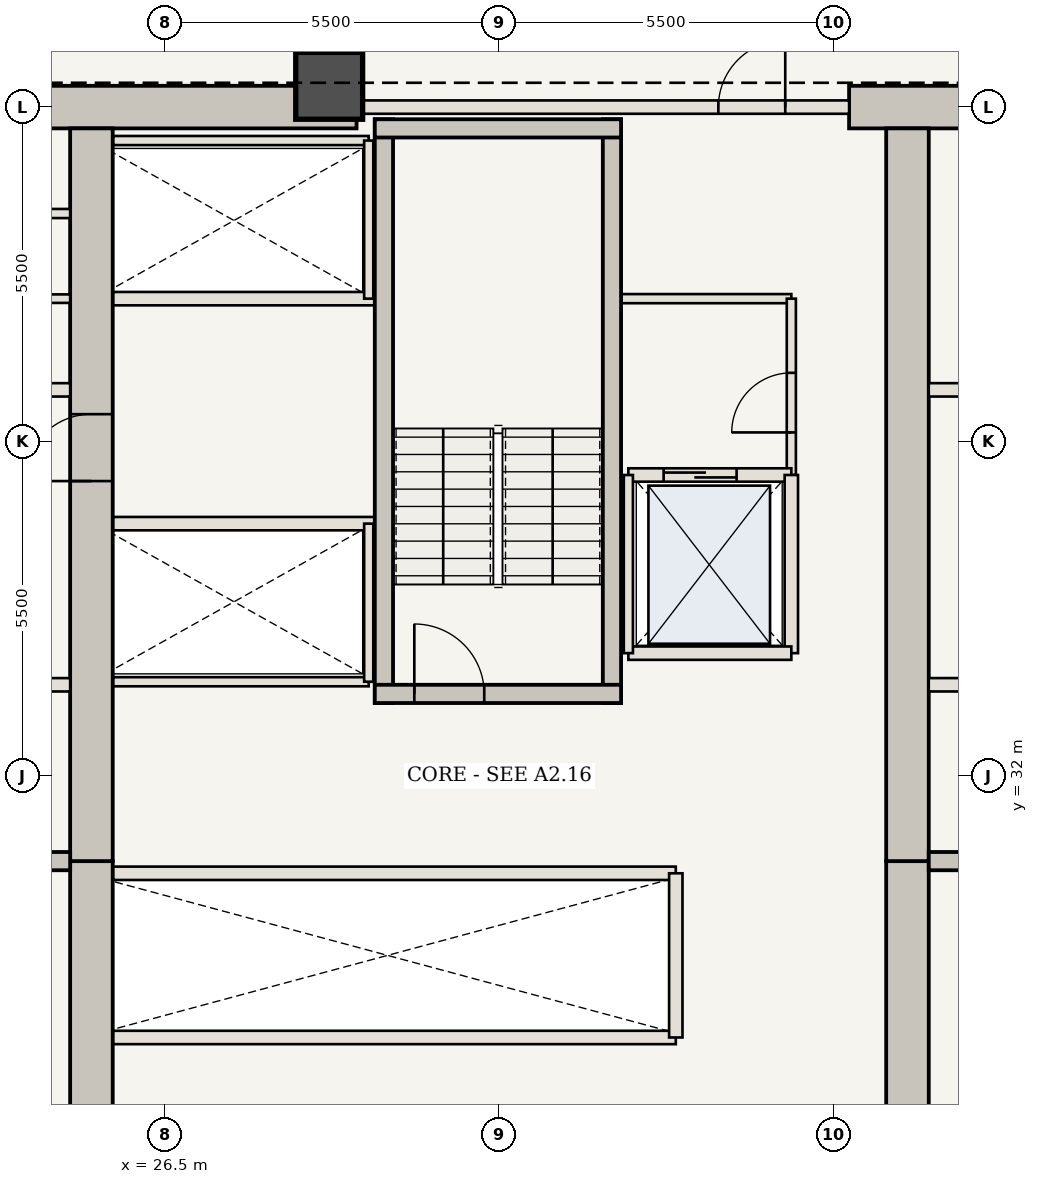
"""IFC4 building model, lengths in metres.
Left out: names, types, materials, properties, quantities, classifications, styles, units other than length and angle.
Written with IfcOpenShell. Run it as: python <this file> out.ifc"""

import sys

from ifc_helpers import new_model, si_unit, direction, frame, frame_2d, origin, origin_2d, place, context, subcontext, project, spatial, rectangle, extrude, element, fill, save


model = new_model("IFC4")
c1 = context("Model", 3, precision=1e-05, world=origin(), true_north=direction((0.0, 1.0)))
c2 = subcontext(c1, "Body", "Model", "MODEL_VIEW")
j1 = project(units=[si_unit("LENGTHUNIT", "METRE"), si_unit("PLANEANGLEUNIT", "RADIAN")], contexts=[c1])
p1 = place(None, origin())
s1 = spatial("IfcSite", under=j1, at=p1, CompositionType="ELEMENT")
p2 = place(p1, origin())
s2 = spatial("IfcBuilding", under=s1, at=p2, CompositionType="ELEMENT")
p3 = place(p2, frame((0.0, 0.0, 63.35)))
s3 = spatial("IfcBuildingStorey", under=s2, at=p3, CompositionType="ELEMENT", Elevation=63.35)
p4 = place(p3, frame((21.41, 43.0, 0.0), z_axis=(0.0, 0.0, 1.0), x_axis=(1.0, 0.0, 0.0)))
e1 = element("IfcWall", 1, at=p4, inside=s3, PredefinedType="SHEAR", context=c2, shape_type="SweptSolid", body=[
    extrude(rectangle(XDim=8.24, YDim=0.7, at=frame_2d((4.12, 0.0))), origin(), (0.0, 0.0, 1.0), 3.5),
])
p5 = place(p3, frame((37.75, 43.0, 0.0), z_axis=(0.0, 0.0, 1.0), x_axis=(1.0, 0.0, 0.0)))
e2 = element("IfcWall", 2, at=p5, inside=s3, PredefinedType="SHEAR", context=c2, shape_type="SweptSolid", body=[
    extrude(rectangle(XDim=4.84, YDim=0.7, at=frame_2d((2.42, 0.0))), origin(), (0.0, 0.0, 1.0), 3.5),
])
p6 = place(p3, frame((25.29, 21.3, 0.0), z_axis=(0.0, 0.0, 1.0), x_axis=(0.0, 1.0, 0.0)))
e3 = element("IfcWall", 3, at=p6, inside=s3, PredefinedType="SHEAR", context=c2, shape_type="SweptSolid", body=[
    extrude(rectangle(XDim=9.3, YDim=0.7, at=frame_2d((4.65, 0.0))), origin(), (0.0, 0.0, 1.0), 3.5),
])
p7 = place(p3, frame((25.29, 30.6, 0.0), z_axis=(0.0, 0.0, 1.0), x_axis=(0.0, 1.0, 0.0)))
e4 = element("IfcWall", 4, at=p7, inside=s3, PredefinedType="SHEAR", context=c2, shape_type="SweptSolid", body=[
    extrude(rectangle(XDim=12.05, YDim=0.7, at=frame_2d((6.025, 0.0))), origin(), (0.0, 0.0, 1.0), 3.5),
])
p8 = place(p7, frame((6.25, 0.0, 0.0)))
e5 = element("IfcOpeningElement", 5, at=p8, cuts=e4, PredefinedType="OPENING", context=c2, shape_type="SweptSolid", body=[
    extrude(rectangle(XDim=1.1, YDim=2.15, at=frame_2d((0.55, 1.075))), frame((0.0, 0.36, 0.0), z_axis=(0.0, -1.0, 0.0), x_axis=(1.0, 0.0, 0.0)), (0.0, 0.0, 1.0), 0.72),
])
p9 = place(p3, frame((38.71, 21.3, 0.0), z_axis=(0.0, 0.0, 1.0), x_axis=(0.0, 1.0, 0.0)))
e6 = element("IfcWall", 6, at=p9, inside=s3, PredefinedType="SHEAR", context=c2, shape_type="SweptSolid", body=[
    extrude(rectangle(XDim=9.3, YDim=0.7, at=frame_2d((4.65, 0.0))), origin(), (0.0, 0.0, 1.0), 3.5),
])
p10 = place(p3, frame((38.71, 30.6, 0.0), z_axis=(0.0, 0.0, 1.0), x_axis=(0.0, 1.0, 0.0)))
e7 = element("IfcWall", 7, at=p10, inside=s3, PredefinedType="SHEAR", context=c2, shape_type="SweptSolid", body=[
    extrude(rectangle(XDim=12.05, YDim=0.7, at=frame_2d((6.025, 0.0))), origin(), (0.0, 0.0, 1.0), 3.5),
])
p11 = place(p3, frame((29.2, 43.35, 0.0), z_axis=(0.0, 0.0, 1.0), x_axis=(1.0, 0.0, 0.0)))
e8 = element("IfcColumn", 8, at=p11, inside=s3, PredefinedType="COLUMN", context=c2, shape_type="SweptSolid", body=[
    extrude(rectangle(XDim=1.1, YDim=1.1, at=origin_2d()), origin(), (0.0, 0.0, 1.0), 3.5),
])
for number, where, z_axis, x_axis in (
    (9, (21.41, 30.6, 0.0), (0.0, 0.0, 1.0), (1.0, 0.0, 0.0)),
    (10, (39.06, 30.6, 0.0), (0.0, 0.0, 1.0), (1.0, 0.0, 0.0)),
):
    element("IfcWall", number, at=place(p3, frame(where, z_axis=z_axis, x_axis=x_axis)), inside=s3, PredefinedType="SHEAR", context=c2, shape_type="SweptSolid", body=[
        extrude(rectangle(XDim=3.53, YDim=0.3, at=frame_2d((1.765, 0.0))), origin(), (0.0, 0.0, 1.0), 3.32),
    ])
p12 = place(p3, frame((21.41, 33.5, 0.0), z_axis=(0.0, 0.0, 1.0), x_axis=(1.0, 0.0, 0.0)))
e11 = element("IfcWall", 11, at=p12, inside=s3, PredefinedType="STANDARD", context=c2, shape_type="SweptSolid", body=[
    extrude(rectangle(XDim=3.53, YDim=0.22, at=frame_2d((1.765, 0.0))), origin(), (0.0, 0.0, 1.0), 3.32),
])
p13 = place(p12, frame((0.75, 0.0, 0.0)))
e12 = element("IfcOpeningElement", 12, at=p13, cuts=e11, PredefinedType="OPENING", context=c2, shape_type="SweptSolid", body=[
    extrude(rectangle(XDim=1.2, YDim=2.2, at=frame_2d((0.6, 1.1))), frame((0.0, 0.12, 0.0), z_axis=(0.0, -1.0, 0.0), x_axis=(1.0, 0.0, 0.0)), (0.0, 0.0, 1.0), 0.24),
])
p14 = place(p3, frame((39.06, 33.5, 0.0), z_axis=(0.0, 0.0, 1.0), x_axis=(1.0, 0.0, 0.0)))
e13 = element("IfcWall", 13, at=p14, inside=s3, PredefinedType="STANDARD", context=c2, shape_type="SweptSolid", body=[
    extrude(rectangle(XDim=3.53, YDim=0.22, at=frame_2d((1.765, 0.0))), origin(), (0.0, 0.0, 1.0), 3.32),
])
p15 = place(p14, frame((1.55, 0.0, 0.0)))
e14 = element("IfcOpeningElement", 14, at=p15, cuts=e13, PredefinedType="OPENING", context=c2, shape_type="SweptSolid", body=[
    extrude(rectangle(XDim=1.2, YDim=2.2, at=frame_2d((0.6, 1.1))), frame((0.0, 0.12, 0.0), z_axis=(0.0, -1.0, 0.0), x_axis=(1.0, 0.0, 0.0)), (0.0, 0.0, 1.0), 0.24),
])
for number, where, z_axis, x_axis in (
    (15, (21.41, 38.35, 0.0), (0.0, 0.0, 1.0), (1.0, 0.0, 0.0)),
    (16, (39.06, 38.35, 0.0), (0.0, 0.0, 1.0), (1.0, 0.0, 0.0)),
):
    element("IfcWall", number, at=place(p3, frame(where, z_axis=z_axis, x_axis=x_axis)), inside=s3, PredefinedType="STANDARD", context=c2, shape_type="SweptSolid", body=[
        extrude(rectangle(XDim=3.53, YDim=0.22, at=frame_2d((1.765, 0.0))), origin(), (0.0, 0.0, 1.0), 3.32),
    ])
p16 = place(p3, frame((21.41, 39.85, 0.0), z_axis=(0.0, 0.0, 1.0), x_axis=(1.0, 0.0, 0.0)))
e17 = element("IfcWall", 17, at=p16, inside=s3, PredefinedType="STANDARD", context=c2, shape_type="SweptSolid", body=[
    extrude(rectangle(XDim=3.53, YDim=0.14, at=frame_2d((1.765, 0.0))), origin(), (0.0, 0.0, 1.0), 3.32),
])
p17 = place(p3, frame((21.41, 41.25, 0.0), z_axis=(0.0, 0.0, 1.0), x_axis=(1.0, 0.0, 0.0)))
e18 = element("IfcWall", 18, at=p17, inside=s3, PredefinedType="STANDARD", context=c2, shape_type="SweptSolid", body=[
    extrude(rectangle(XDim=3.53, YDim=0.15, at=frame_2d((1.765, 0.0))), origin(), (0.0, 0.0, 1.0), 3.32),
])
p18 = place(p3, frame((34.0, 39.85, 0.0), z_axis=(0.0, 0.0, 1.0), x_axis=(1.0, 0.0, 0.0)))
e19 = element("IfcWall", 19, at=p18, inside=s3, PredefinedType="STANDARD", context=c2, shape_type="SweptSolid", body=[
    extrude(rectangle(XDim=2.8, YDim=0.15, at=frame_2d((1.4, 0.0))), origin(), (0.0, 0.0, 1.0), 3.32),
])
p19 = place(p3, frame((36.8, 36.95, 0.0), z_axis=(0.0, 0.0, 1.0), x_axis=(0.0, 1.0, 0.0)))
e20 = element("IfcWall", 20, at=p19, inside=s3, PredefinedType="STANDARD", context=c2, shape_type="SweptSolid", body=[
    extrude(rectangle(XDim=2.9, YDim=0.15, at=frame_2d((1.45, 0.0))), origin(), (0.0, 0.0, 1.0), 3.32),
])
p20 = place(p19, frame((0.7, 0.0, 0.0)))
e21 = element("IfcOpeningElement", 21, at=p20, cuts=e20, PredefinedType="OPENING", context=c2, shape_type="SweptSolid", body=[
    extrude(rectangle(XDim=0.98, YDim=2.2, at=frame_2d((0.49, 1.1))), frame((0.0, 0.085, 0.0), z_axis=(0.0, -1.0, 0.0), x_axis=(1.0, 0.0, 0.0)), (0.0, 0.0, 1.0), 0.17),
])
for number, where, z_axis, x_axis in (
    (22, (25.65, 27.7, 0.0), (0.0, 0.0, 1.0), (1.0, 0.0, 0.0)),
    (23, (25.65, 30.4, 0.0), (0.0, 0.0, 1.0), (1.0, 0.0, 0.0)),
):
    element("IfcWall", number, at=place(p3, frame(where, z_axis=z_axis, x_axis=x_axis)), inside=s3, PredefinedType="STANDARD", context=c2, shape_type="SweptSolid", body=[
        extrude(rectangle(XDim=9.25, YDim=0.22, at=frame_2d((4.625, 0.0))), origin(), (0.0, 0.0, 1.0), 3.32),
    ])
p21 = place(p3, frame((34.9, 27.7, 0.0), z_axis=(0.0, 0.0, 1.0), x_axis=(0.0, 1.0, 0.0)))
e24 = element("IfcWall", 24, at=p21, inside=s3, PredefinedType="STANDARD", context=c2, shape_type="SweptSolid", body=[
    extrude(rectangle(XDim=2.7, YDim=0.22, at=frame_2d((1.35, 0.0))), origin(), (0.0, 0.0, 1.0), 3.32),
])
p22 = place(p3, frame((25.65, 36.15, 0.0), z_axis=(0.0, 0.0, 1.0), x_axis=(1.0, 0.0, 0.0)))
e25 = element("IfcWall", 25, at=p22, inside=s3, PredefinedType="STANDARD", context=c2, shape_type="SweptSolid", body=[
    extrude(rectangle(XDim=4.3, YDim=0.22, at=frame_2d((2.15, 0.0))), origin(), (0.0, 0.0, 1.0), 3.32),
])
p23 = place(p3, frame((25.65, 33.55, 0.0), z_axis=(0.0, 0.0, 1.0), x_axis=(1.0, 0.0, 0.0)))
e26 = element("IfcWall", 26, at=p23, inside=s3, PredefinedType="STANDARD", context=c2, shape_type="SweptSolid", body=[
    extrude(rectangle(XDim=4.2, YDim=0.15, at=frame_2d((2.1, 0.0))), origin(), (0.0, 0.0, 1.0), 3.32),
])
p24 = place(p3, frame((29.85, 33.55, 0.0), z_axis=(0.0, 0.0, 1.0), x_axis=(0.0, 1.0, 0.0)))
e27 = element("IfcWall", 27, at=p24, inside=s3, PredefinedType="STANDARD", context=c2, shape_type="SweptSolid", body=[
    extrude(rectangle(XDim=2.6, YDim=0.15, at=frame_2d((1.3, 0.0))), origin(), (0.0, 0.0, 1.0), 3.32),
])
p25 = place(p3, frame((25.65, 39.85, 0.0), z_axis=(0.0, 0.0, 1.0), x_axis=(1.0, 0.0, 0.0)))
e28 = element("IfcWall", 28, at=p25, inside=s3, PredefinedType="STANDARD", context=c2, shape_type="SweptSolid", body=[
    extrude(rectangle(XDim=4.3, YDim=0.22, at=frame_2d((2.15, 0.0))), origin(), (0.0, 0.0, 1.0), 3.32),
])
p26 = place(p3, frame((25.65, 42.45, 0.0), z_axis=(0.0, 0.0, 1.0), x_axis=(1.0, 0.0, 0.0)))
e29 = element("IfcWall", 29, at=p26, inside=s3, PredefinedType="STANDARD", context=c2, shape_type="SweptSolid", body=[
    extrude(rectangle(XDim=4.2, YDim=0.15, at=frame_2d((2.1, 0.0))), origin(), (0.0, 0.0, 1.0), 3.32),
])
p27 = place(p3, frame((29.85, 39.85, 0.0), z_axis=(0.0, 0.0, 1.0), x_axis=(0.0, 1.0, 0.0)))
e30 = element("IfcWall", 30, at=p27, inside=s3, PredefinedType="STANDARD", context=c2, shape_type="SweptSolid", body=[
    extrude(rectangle(XDim=2.6, YDim=0.15, at=frame_2d((1.3, 0.0))), origin(), (0.0, 0.0, 1.0), 3.32),
])
for number, where, z_axis, x_axis in (
    (31, (30.1, 33.2, 0.0), (0.0, 0.0, 1.0), (0.0, 1.0, 0.0)),
    (32, (33.85, 33.2, 0.0), (0.0, 0.0, 1.0), (0.0, 1.0, 0.0)),
):
    element("IfcWall", number, at=place(p3, frame(where, z_axis=z_axis, x_axis=x_axis)), inside=s3, PredefinedType="SHEAR", context=c2, shape_type="SweptSolid", body=[
        extrude(rectangle(XDim=9.6, YDim=0.3, at=frame_2d((4.8, 0.0))), origin(), (0.0, 0.0, 1.0), 3.32),
    ])
p28 = place(p3, frame((29.95, 33.35, 0.0), z_axis=(0.0, 0.0, 1.0), x_axis=(1.0, 0.0, 0.0)))
e33 = element("IfcWall", 33, at=p28, inside=s3, PredefinedType="SHEAR", context=c2, shape_type="SweptSolid", body=[
    extrude(rectangle(XDim=4.05, YDim=0.3, at=frame_2d((2.025, 0.0))), origin(), (0.0, 0.0, 1.0), 3.32),
])
p29 = place(p28, frame((0.65, 0.0, 0.0)))
e34 = element("IfcOpeningElement", 34, at=p29, cuts=e33, PredefinedType="OPENING", context=c2, shape_type="SweptSolid", body=[
    extrude(rectangle(XDim=1.15, YDim=2.15, at=frame_2d((0.575, 1.075))), frame((0.0, 0.16, 0.0), z_axis=(0.0, -1.0, 0.0), x_axis=(1.0, 0.0, 0.0)), (0.0, 0.0, 1.0), 0.32),
])
p30 = place(p3, frame((29.95, 42.65, 0.0), z_axis=(0.0, 0.0, 1.0), x_axis=(1.0, 0.0, 0.0)))
e35 = element("IfcWall", 35, at=p30, inside=s3, PredefinedType="SHEAR", context=c2, shape_type="SweptSolid", body=[
    extrude(rectangle(XDim=4.05, YDim=0.3, at=frame_2d((2.025, 0.0))), origin(), (0.0, 0.0, 1.0), 3.32),
])
p31 = place(p3, frame((29.65, 43.0, 0.0), z_axis=(0.0, 0.0, 1.0), x_axis=(1.0, 0.0, 0.0)))
e36 = element("IfcWall", 36, at=p31, inside=s3, PredefinedType="STANDARD", context=c2, shape_type="SweptSolid", body=[
    extrude(rectangle(XDim=8.1, YDim=0.22, at=frame_2d((4.05, 0.0))), origin(), (0.0, 0.0, 1.0), 3.32),
])
p32 = place(p31, frame((5.95, 0.0, 0.0)))
e37 = element("IfcOpeningElement", 37, at=p32, cuts=e36, PredefinedType="OPENING", context=c2, shape_type="SweptSolid", body=[
    extrude(rectangle(XDim=1.1, YDim=2.15, at=frame_2d((0.55, 1.075))), frame((0.0, 0.12, 0.0), z_axis=(0.0, -1.0, 0.0), x_axis=(1.0, 0.0, 0.0)), (0.0, 0.0, 1.0), 0.24),
])
p33 = place(p3, frame((34.12, 36.95, 0.0), z_axis=(0.0, 0.0, 1.0), x_axis=(1.0, 0.0, 0.0)))
e38 = element("IfcWall", 38, at=p33, inside=s3, PredefinedType="STANDARD", context=c2, shape_type="SweptSolid", body=[
    extrude(rectangle(XDim=2.68, YDim=0.22, at=frame_2d((1.34, 0.0))), origin(), (0.0, 0.0, 1.0), 3.32),
])
p34 = place(p33, frame((0.58, 0.0, 0.0)))
e39 = element("IfcOpeningElement", 39, at=p34, cuts=e38, PredefinedType="OPENING", context=c2, shape_type="SweptSolid", body=[
    extrude(rectangle(XDim=1.2, YDim=2.2, at=frame_2d((0.6, 1.1))), frame((0.0, 0.12, 0.0), z_axis=(0.0, -1.0, 0.0), x_axis=(1.0, 0.0, 0.0)), (0.0, 0.0, 1.0), 0.24),
])
p35 = place(p3, frame((36.8, 34.02, 0.0), z_axis=(0.0, 0.0, 1.0), x_axis=(0.0, 1.0, 0.0)))
e40 = element("IfcWall", 40, at=p35, inside=s3, PredefinedType="STANDARD", context=c2, shape_type="SweptSolid", body=[
    extrude(rectangle(XDim=2.93, YDim=0.22, at=frame_2d((1.465, 0.0))), origin(), (0.0, 0.0, 1.0), 3.32),
])
p36 = place(p3, frame((34.12, 34.02, 0.0), z_axis=(0.0, 0.0, 1.0), x_axis=(1.0, 0.0, 0.0)))
e41 = element("IfcWall", 41, at=p36, inside=s3, PredefinedType="STANDARD", context=c2, shape_type="SweptSolid", body=[
    extrude(rectangle(XDim=2.68, YDim=0.22, at=frame_2d((1.34, 0.0))), origin(), (0.0, 0.0, 1.0), 3.32),
])
p37 = place(p3, frame((34.12, 34.02, 0.0), z_axis=(0.0, 0.0, 1.0), x_axis=(0.0, 1.0, 0.0)))
e42 = element("IfcWall", 42, at=p37, inside=s3, PredefinedType="STANDARD", context=c2, shape_type="SweptSolid", body=[
    extrude(rectangle(XDim=2.93, YDim=0.15, at=frame_2d((1.465, 0.0))), origin(), (0.0, 0.0, 1.0), 3.32),
])
p38 = place(p8, origin())
e43 = element("IfcDoor", 43, at=p38, inside=s3, OperationType="SINGLE_SWING_LEFT", PredefinedType="DOOR", context=c2, shape_type="SweptSolid", body=[
    extrude(rectangle(XDim=1.1, YDim=2.15, at=frame_2d((0.55, 1.075))), frame((0.0, 0.025, 0.0), z_axis=(0.0, -1.0, 0.0), x_axis=(1.0, 0.0, 0.0)), (0.0, 0.0, 1.0), 0.05),
])
fill(e5, e43)
p39 = place(p20, origin())
e44 = element("IfcDoor", 44, at=p39, inside=s3, OperationType="SINGLE_SWING_LEFT", PredefinedType="DOOR", context=c2, shape_type="SweptSolid", body=[
    extrude(rectangle(XDim=0.98, YDim=2.2, at=frame_2d((0.49, 1.1))), frame((0.0, 0.025, 0.0), z_axis=(0.0, -1.0, 0.0), x_axis=(1.0, 0.0, 0.0)), (0.0, 0.0, 1.0), 0.05),
])
fill(e21, e44)
p40 = place(p29, origin())
e45 = element("IfcDoor", 45, at=p40, inside=s3, OperationType="SINGLE_SWING_LEFT", PredefinedType="DOOR", context=c2, shape_type="SweptSolid", body=[
    extrude(rectangle(XDim=1.15, YDim=2.15, at=frame_2d((0.575, 1.075))), frame((0.0, 0.025, 0.0), z_axis=(0.0, -1.0, 0.0), x_axis=(1.0, 0.0, 0.0)), (0.0, 0.0, 1.0), 0.05),
])
fill(e34, e45)
p41 = place(p32, origin())
e46 = element("IfcDoor", 46, at=p41, inside=s3, OperationType="SINGLE_SWING_RIGHT", PredefinedType="DOOR", context=c2, shape_type="SweptSolid", body=[
    extrude(rectangle(XDim=1.1, YDim=2.15, at=frame_2d((0.55, 1.075))), frame((0.0, 0.025, 0.0), z_axis=(0.0, -1.0, 0.0), x_axis=(1.0, 0.0, 0.0)), (0.0, 0.0, 1.0), 0.05),
])
fill(e37, e46)
p42 = place(p34, origin())
e47 = element("IfcDoor", 47, at=p42, inside=s3, OperationType="DOUBLE_DOOR_SLIDING", PredefinedType="DOOR", context=c2, shape_type="SweptSolid", body=[
    extrude(rectangle(XDim=1.2, YDim=2.2, at=frame_2d((0.6, 1.1))), frame((0.0, 0.025, 0.0), z_axis=(0.0, -1.0, 0.0), x_axis=(1.0, 0.0, 0.0)), (0.0, 0.0, 1.0), 0.05),
])
fill(e39, e47)
save(model, sys.argv[1])
